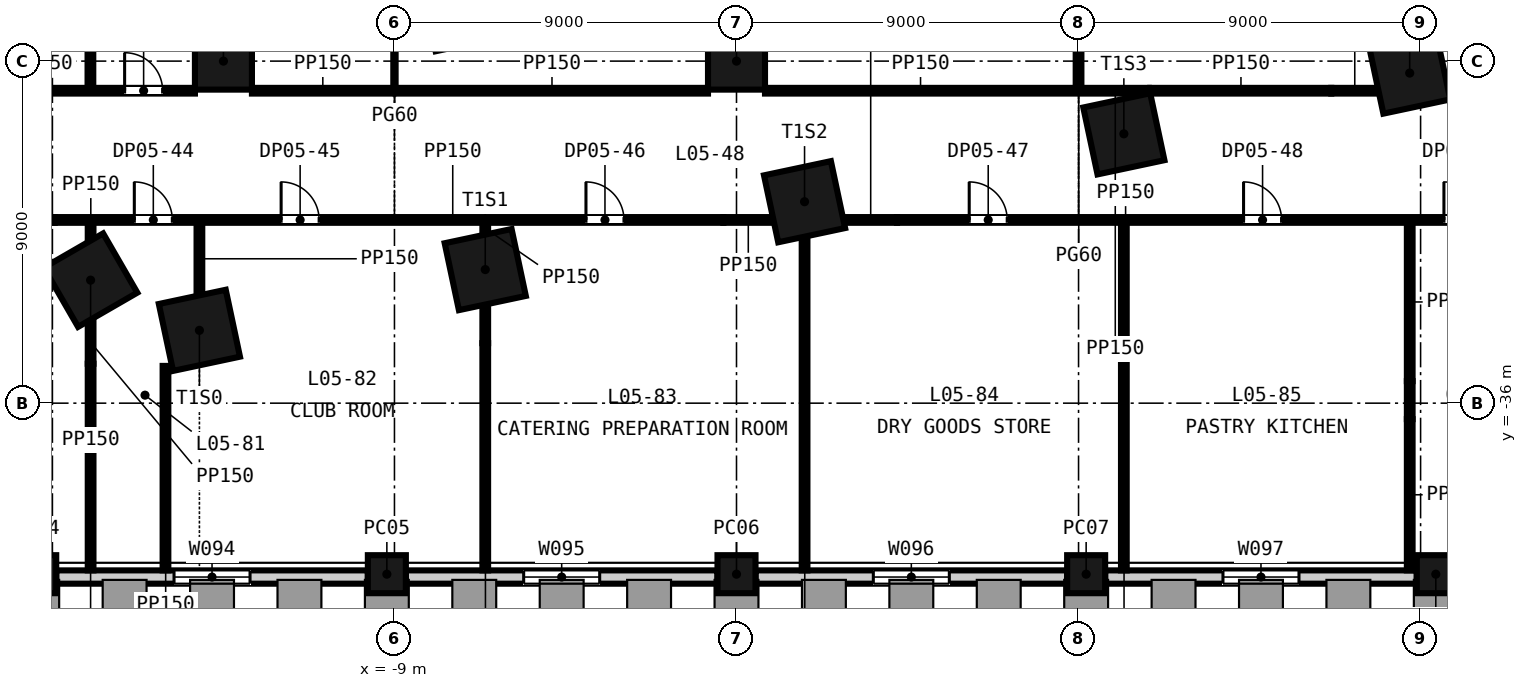
"""IFC4 building model, lengths in metres.
Left out: names, types, materials, properties, quantities, classifications, styles, units other than length and angle.
Written with IfcOpenShell. Run it as: python <this file> out.ifc"""

import sys

from ifc_helpers import new_model, si_unit, direction, frame, frame_2d, origin, origin_2d, place, context, subcontext, project, spatial, rectangle, extrude, element, fill, save


model = new_model("IFC4")
c1 = context("Model", 3, precision=1e-05, world=origin(), true_north=direction((0.0, 1.0)))
c2 = subcontext(c1, "Body", "Model", "MODEL_VIEW")
j1 = project(units=[si_unit("LENGTHUNIT", "METRE"), si_unit("PLANEANGLEUNIT", "RADIAN")], contexts=[c1])
p1 = place(None, origin())
s1 = spatial("IfcSite", under=j1, at=p1, CompositionType="ELEMENT")
p2 = place(p1, origin())
s2 = spatial("IfcBuilding", under=s1, at=p2, CompositionType="ELEMENT")
p3 = place(p2, frame((0.0, 0.0, 31.5)))
s3 = spatial("IfcBuildingStorey", under=s2, at=p3, CompositionType="ELEMENT", Elevation=31.5)
for number, where, z_axis, x_axis in (
    (1, (-16.995, -32.763, -0.3), (0.0, 0.0, 1.0), (0.5, -0.866, 0.0)),
    (2, (-14.132, -34.084, -0.3), (0.0, 0.0, 1.0), (0.978, 0.208, 0.0)),
    (3, (-6.611, -32.485, -0.3), (0.0, 0.0, 1.0), (0.978, 0.208, 0.0)),
    (4, (1.791, -30.699, -0.3), (0.0, 0.0, 1.0), (0.978, 0.208, 0.0)),
    (5, (10.192, -28.914, -0.3), (0.0, 0.0, 1.0), (0.978, 0.208, 0.0)),
    (6, (17.714, -27.315, -0.3), (0.0, 0.0, 1.0), (0.978, 0.208, 0.0)),
):
    element("IfcColumn", number, at=place(p3, frame(where, z_axis=z_axis, x_axis=x_axis)), inside=s3, PredefinedType="COLUMN", context=c2, shape_type="SweptSolid", body=[
        extrude(rectangle(XDim=1.8, YDim=1.8, at=origin_2d()), origin(), (0.0, 0.0, 1.0), 4.65),
    ])
for number, where, z_axis, x_axis in (
    (7, (-13.5, -27.0, -0.3), (0.0, 0.0, 1.0), (1.0, 0.0, 0.0)),
    (8, (0.0, -27.0, -0.3), (0.0, 0.0, 1.0), (1.0, 0.0, 0.0)),
):
    element("IfcColumn", number, at=place(p3, frame(where, z_axis=z_axis, x_axis=x_axis)), inside=s3, PredefinedType="COLUMN", context=c2, shape_type="SweptSolid", body=[
        extrude(rectangle(XDim=1.5, YDim=1.5, at=origin_2d()), origin(), (0.0, 0.0, 1.0), 4.65),
    ])
for number, where, z_axis, x_axis in (
    (9, (-18.4, -40.5, -0.3), (0.0, 0.0, 1.0), (1.0, 0.0, 0.0)),
    (10, (-9.2, -40.5, -0.3), (0.0, 0.0, 1.0), (1.0, 0.0, 0.0)),
    (11, (0.0, -40.5, -0.3), (0.0, 0.0, 1.0), (1.0, 0.0, 0.0)),
    (12, (9.2, -40.5, -0.3), (0.0, 0.0, 1.0), (1.0, 0.0, 0.0)),
    (13, (18.4, -40.5, -0.3), (0.0, 0.0, 1.0), (1.0, 0.0, 0.0)),
):
    element("IfcColumn", number, at=place(p3, frame(where, z_axis=z_axis, x_axis=x_axis)), inside=s3, PredefinedType="COLUMN", context=c2, shape_type="SweptSolid", body=[
        extrude(rectangle(XDim=1.0, YDim=1.0, at=origin_2d()), origin(), (0.0, 0.0, 1.0), 4.65),
    ])
p4 = place(p3, frame((-17.9, -40.575, -0.3), z_axis=(0.0, 0.0, 1.0), x_axis=(1.0, 0.0, 0.0)))
e14 = element("IfcWall", 14, at=p4, inside=s3, PredefinedType="SOLIDWALL", context=c2, shape_type="SweptSolid", body=[
    extrude(rectangle(XDim=8.2, YDim=0.35, at=frame_2d((4.1, 0.0))), origin(), (0.0, 0.0, 1.0), 3.75),
])
p5 = place(p4, frame((3.1, 0.0, 1.2)))
e15 = element("IfcOpeningElement", 15, at=p5, cuts=e14, PredefinedType="OPENING", context=c2, shape_type="SweptSolid", body=[
    extrude(rectangle(XDim=2.0, YDim=2.5, at=frame_2d((1.0, 1.25))), frame((0.0, 0.185, 0.0), z_axis=(0.0, -1.0, 0.0), x_axis=(1.0, 0.0, 0.0)), (0.0, 0.0, 1.0), 0.37),
])
p6 = place(p3, frame((-8.7, -40.575, -0.3), z_axis=(0.0, 0.0, 1.0), x_axis=(1.0, 0.0, 0.0)))
e16 = element("IfcWall", 16, at=p6, inside=s3, PredefinedType="SOLIDWALL", context=c2, shape_type="SweptSolid", body=[
    extrude(rectangle(XDim=8.2, YDim=0.35, at=frame_2d((4.1, 0.0))), origin(), (0.0, 0.0, 1.0), 3.75),
])
p7 = place(p6, frame((3.1, 0.0, 1.2)))
e17 = element("IfcOpeningElement", 17, at=p7, cuts=e16, PredefinedType="OPENING", context=c2, shape_type="SweptSolid", body=[
    extrude(rectangle(XDim=2.0, YDim=2.5, at=frame_2d((1.0, 1.25))), frame((0.0, 0.185, 0.0), z_axis=(0.0, -1.0, 0.0), x_axis=(1.0, 0.0, 0.0)), (0.0, 0.0, 1.0), 0.37),
])
p8 = place(p3, frame((0.5, -40.575, -0.3), z_axis=(0.0, 0.0, 1.0), x_axis=(1.0, 0.0, 0.0)))
e18 = element("IfcWall", 18, at=p8, inside=s3, PredefinedType="SOLIDWALL", context=c2, shape_type="SweptSolid", body=[
    extrude(rectangle(XDim=8.2, YDim=0.35, at=frame_2d((4.1, 0.0))), origin(), (0.0, 0.0, 1.0), 3.75),
])
p9 = place(p8, frame((3.1, 0.0, 1.2)))
e19 = element("IfcOpeningElement", 19, at=p9, cuts=e18, PredefinedType="OPENING", context=c2, shape_type="SweptSolid", body=[
    extrude(rectangle(XDim=2.0, YDim=2.5, at=frame_2d((1.0, 1.25))), frame((0.0, 0.185, 0.0), z_axis=(0.0, -1.0, 0.0), x_axis=(1.0, 0.0, 0.0)), (0.0, 0.0, 1.0), 0.37),
])
p10 = place(p3, frame((9.7, -40.575, -0.3), z_axis=(0.0, 0.0, 1.0), x_axis=(1.0, 0.0, 0.0)))
e20 = element("IfcWall", 20, at=p10, inside=s3, PredefinedType="SOLIDWALL", context=c2, shape_type="SweptSolid", body=[
    extrude(rectangle(XDim=8.2, YDim=0.35, at=frame_2d((4.1, 0.0))), origin(), (0.0, 0.0, 1.0), 3.75),
])
p11 = place(p10, frame((3.1, 0.0, 1.2)))
e21 = element("IfcOpeningElement", 21, at=p11, cuts=e20, PredefinedType="OPENING", context=c2, shape_type="SweptSolid", body=[
    extrude(rectangle(XDim=2.0, YDim=2.5, at=frame_2d((1.0, 1.25))), frame((0.0, 0.185, 0.0), z_axis=(0.0, -1.0, 0.0), x_axis=(1.0, 0.0, 0.0)), (0.0, 0.0, 1.0), 0.37),
])
p12 = place(p3, frame((-19.036, -31.179, 0.0), z_axis=(0.0, 0.0, 1.0), x_axis=(1.0, 0.0, 0.0)))
e22 = element("IfcWall", 22, at=p12, inside=s3, PredefinedType="PARTITIONING", context=c2, shape_type="SweptSolid", body=[
    extrude(rectangle(XDim=1.097, YDim=0.15, at=frame_2d((0.548, 0.0))), origin(), (0.0, 0.0, 1.0), 3.5),
])
p13 = place(p3, frame((-17.939, -31.179, 0.0), z_axis=(0.0, 0.0, 1.0), x_axis=(1.0, 0.0, 0.0)))
e23 = element("IfcWall", 23, at=p13, inside=s3, PredefinedType="PARTITIONING", context=c2, shape_type="SweptSolid", body=[
    extrude(rectangle(XDim=17.593, YDim=0.15, at=frame_2d((8.796, 0.0))), origin(), (0.0, 0.0, 1.0), 4.35),
])
p14 = place(p13, frame((2.094, 0.0, 0.0)))
e24 = element("IfcOpeningElement", 24, at=p14, cuts=e23, PredefinedType="OPENING", context=c2, shape_type="SweptSolid", body=[
    extrude(rectangle(XDim=1.0, YDim=2.1, at=frame_2d((0.5, 1.05))), frame((0.0, 0.085, 0.0), z_axis=(0.0, -1.0, 0.0), x_axis=(1.0, 0.0, 0.0)), (0.0, 0.0, 1.0), 0.17),
])
p15 = place(p13, frame((5.957, 0.0, 0.0)))
e25 = element("IfcOpeningElement", 25, at=p15, cuts=e23, PredefinedType="OPENING", context=c2, shape_type="SweptSolid", body=[
    extrude(rectangle(XDim=1.0, YDim=2.1, at=frame_2d((0.5, 1.05))), frame((0.0, 0.085, 0.0), z_axis=(0.0, -1.0, 0.0), x_axis=(1.0, 0.0, 0.0)), (0.0, 0.0, 1.0), 0.17),
])
p16 = place(p13, frame((13.978, 0.0, 0.0)))
e26 = element("IfcOpeningElement", 26, at=p16, cuts=e23, PredefinedType="OPENING", context=c2, shape_type="SweptSolid", body=[
    extrude(rectangle(XDim=1.0, YDim=2.1, at=frame_2d((0.5, 1.05))), frame((0.0, 0.085, 0.0), z_axis=(0.0, -1.0, 0.0), x_axis=(1.0, 0.0, 0.0)), (0.0, 0.0, 1.0), 0.17),
])
p17 = place(p3, frame((-0.346, -31.179, 0.0), z_axis=(0.0, 0.0, 1.0), x_axis=(1.0, 0.0, 0.0)))
e27 = element("IfcWall", 27, at=p17, inside=s3, PredefinedType="PARTITIONING", context=c2, shape_type="SweptSolid", body=[
    extrude(rectangle(XDim=1.302, YDim=0.15, at=frame_2d((0.651, 0.0))), origin(), (0.0, 0.0, 1.0), 3.5),
])
p18 = place(p3, frame((2.829, -31.179, 0.0), z_axis=(0.0, 0.0, 1.0), x_axis=(1.0, 0.0, 0.0)))
e28 = element("IfcWall", 28, at=p18, inside=s3, PredefinedType="PARTITIONING", context=c2, shape_type="SweptSolid", body=[
    extrude(rectangle(XDim=1.395, YDim=0.15, at=frame_2d((0.697, 0.0))), origin(), (0.0, 0.0, 1.0), 3.5),
])
p19 = place(p3, frame((4.223, -31.179, 0.0), z_axis=(0.0, 0.0, 1.0), x_axis=(1.0, 0.0, 0.0)))
e29 = element("IfcWall", 29, at=p19, inside=s3, PredefinedType="PARTITIONING", context=c2, shape_type="SweptSolid", body=[
    extrude(rectangle(XDim=16.11, YDim=0.15, at=frame_2d((8.055, 0.0))), origin(), (0.0, 0.0, 1.0), 4.35),
])
p20 = place(p19, frame((1.9, 0.0, 0.0)))
e30 = element("IfcOpeningElement", 30, at=p20, cuts=e29, PredefinedType="OPENING", context=c2, shape_type="SweptSolid", body=[
    extrude(rectangle(XDim=1.0, YDim=2.1, at=frame_2d((0.5, 1.05))), frame((0.0, 0.085, 0.0), z_axis=(0.0, -1.0, 0.0), x_axis=(1.0, 0.0, 0.0)), (0.0, 0.0, 1.0), 0.17),
])
p21 = place(p19, frame((9.119, 0.0, 0.0)))
e31 = element("IfcOpeningElement", 31, at=p21, cuts=e29, PredefinedType="OPENING", context=c2, shape_type="SweptSolid", body=[
    extrude(rectangle(XDim=1.0, YDim=2.1, at=frame_2d((0.5, 1.05))), frame((0.0, 0.085, 0.0), z_axis=(0.0, -1.0, 0.0), x_axis=(1.0, 0.0, 0.0)), (0.0, 0.0, 1.0), 0.17),
])
p22 = place(p19, frame((14.391, 0.0, 0.0)))
e32 = element("IfcOpeningElement", 32, at=p22, cuts=e29, PredefinedType="OPENING", context=c2, shape_type="SweptSolid", body=[
    extrude(rectangle(XDim=1.0, YDim=2.1, at=frame_2d((0.5, 1.05))), frame((0.0, 0.085, 0.0), z_axis=(0.0, -1.0, 0.0), x_axis=(1.0, 0.0, 0.0)), (0.0, 0.0, 1.0), 0.17),
])
p23 = place(p3, frame((-20.319, -27.779, 0.0), z_axis=(0.0, 0.0, 1.0), x_axis=(1.0, 0.0, 0.0)))
e33 = element("IfcWall", 33, at=p23, inside=s3, PredefinedType="PARTITIONING", context=c2, shape_type="SweptSolid", body=[
    extrude(rectangle(XDim=6.069, YDim=0.15, at=frame_2d((3.035, 0.0))), origin(), (0.0, 0.0, 1.0), 4.35),
])
p24 = place(p23, frame((4.219, 0.0, 0.0)))
e34 = element("IfcOpeningElement", 34, at=p24, cuts=e33, PredefinedType="OPENING", context=c2, shape_type="SweptSolid", body=[
    extrude(rectangle(XDim=1.0, YDim=2.1, at=frame_2d((0.5, 1.05))), frame((0.0, 0.085, 0.0), z_axis=(0.0, -1.0, 0.0), x_axis=(1.0, 0.0, 0.0)), (0.0, 0.0, 1.0), 0.17),
])
p25 = place(p3, frame((-12.75, -27.779, 0.0), z_axis=(0.0, 0.0, 1.0), x_axis=(1.0, 0.0, 0.0)))
e35 = element("IfcWall", 35, at=p25, inside=s3, PredefinedType="PARTITIONING", context=c2, shape_type="SweptSolid", body=[
    extrude(rectangle(XDim=3.72, YDim=0.15, at=frame_2d((1.86, 0.0))), origin(), (0.0, 0.0, 1.0), 4.35),
])
p26 = place(p3, frame((-8.97, -27.779, 0.0), z_axis=(0.0, 0.0, 1.0), x_axis=(1.0, 0.0, 0.0)))
e36 = element("IfcWall", 36, at=p26, inside=s3, PredefinedType="PARTITIONING", context=c2, shape_type="SweptSolid", body=[
    extrude(rectangle(XDim=8.22, YDim=0.15, at=frame_2d((4.11, 0.0))), origin(), (0.0, 0.0, 1.0), 4.35),
])
p27 = place(p3, frame((0.75, -27.779, 0.0), z_axis=(0.0, 0.0, 1.0), x_axis=(1.0, 0.0, 0.0)))
e37 = element("IfcWall", 37, at=p27, inside=s3, PredefinedType="PARTITIONING", context=c2, shape_type="SweptSolid", body=[
    extrude(rectangle(XDim=8.175, YDim=0.15, at=frame_2d((4.087, 0.0))), origin(), (0.0, 0.0, 1.0), 4.35),
])
p28 = place(p3, frame((9.075, -27.779, 0.0), z_axis=(0.0, 0.0, 1.0), x_axis=(1.0, 0.0, 0.0)))
e38 = element("IfcWall", 38, at=p28, inside=s3, PredefinedType="PARTITIONING", context=c2, shape_type="SweptSolid", body=[
    extrude(rectangle(XDim=1.773, YDim=0.15, at=frame_2d((0.886, 0.0))), origin(), (0.0, 0.0, 1.0), 4.35),
])
p29 = place(p3, frame((10.887, -27.779, 0.0), z_axis=(0.0, 0.0, 1.0), x_axis=(1.0, 0.0, 0.0)))
e39 = element("IfcWall", 39, at=p29, inside=s3, PredefinedType="PARTITIONING", context=c2, shape_type="SweptSolid", body=[
    extrude(rectangle(XDim=4.762, YDim=0.15, at=frame_2d((2.381, 0.0))), origin(), (0.0, 0.0, 1.0), 4.35),
])
p30 = place(p3, frame((15.65, -27.779, 0.0), z_axis=(0.0, 0.0, 1.0), x_axis=(1.0, 0.0, 0.0)))
e40 = element("IfcWall", 40, at=p30, inside=s3, PredefinedType="PARTITIONING", context=c2, shape_type="SweptSolid", body=[
    extrude(rectangle(XDim=1.227, YDim=0.15, at=frame_2d((0.613, 0.0))), origin(), (0.0, 0.0, 1.0), 3.5),
])
p31 = place(p3, frame((-17.0, -27.704, 0.0), z_axis=(0.0, 0.0, 1.0), x_axis=(0.0, 1.0, 0.0)))
e41 = element("IfcWall", 41, at=p31, inside=s3, PredefinedType="PARTITIONING", context=c2, shape_type="SweptSolid", body=[
    extrude(rectangle(XDim=12.14, YDim=0.15, at=frame_2d((6.07, 0.0))), origin(), (0.0, 0.0, 1.0), 4.35),
])
p32 = place(p3, frame((-16.995, -40.4, 0.0), z_axis=(0.0, 0.0, 1.0), x_axis=(0.0, 1.0, 0.0)))
e42 = element("IfcWall", 42, at=p32, inside=s3, PredefinedType="PARTITIONING", context=c2, shape_type="SweptSolid", body=[
    extrude(rectangle(XDim=5.438, YDim=0.15, at=frame_2d((2.719, 0.0))), origin(), (0.0, 0.0, 1.0), 4.35),
])
p33 = place(p3, frame((-16.995, -34.962, 0.0), z_axis=(0.0, 0.0, 1.0), x_axis=(0.0, 1.0, 0.0)))
e43 = element("IfcWall", 43, at=p33, inside=s3, PredefinedType="PARTITIONING", context=c2, shape_type="SweptSolid", body=[
    extrude(rectangle(XDim=1.117, YDim=0.15, at=frame_2d((0.558, 0.0))), origin(), (0.0, 0.0, 1.0), 3.826),
])
p34 = place(p3, frame((-16.995, -31.681, 0.0), z_axis=(0.0, 0.0, 1.0), x_axis=(0.0, 1.0, 0.0)))
e44 = element("IfcWall", 44, at=p34, inside=s3, PredefinedType="PARTITIONING", context=c2, shape_type="SweptSolid", body=[
    extrude(rectangle(XDim=0.427, YDim=0.15, at=frame_2d((0.213, 0.0))), origin(), (0.0, 0.0, 1.0), 4.35),
])
p35 = place(p3, frame((-15.025, -40.4, 0.0), z_axis=(0.0, 0.0, 1.0), x_axis=(0.0, 1.0, 0.0)))
e45 = element("IfcWall", 45, at=p35, inside=s3, PredefinedType="PARTITIONING", context=c2, shape_type="SweptSolid", body=[
    extrude(rectangle(XDim=5.38, YDim=0.15, at=frame_2d((2.69, 0.0))), origin(), (0.0, 0.0, 1.0), 4.35),
])
p36 = place(p3, frame((-14.132, -33.148, 0.0), z_axis=(0.0, 0.0, 1.0), x_axis=(0.0, 1.0, 0.0)))
e46 = element("IfcWall", 46, at=p36, inside=s3, PredefinedType="PARTITIONING", context=c2, shape_type="SweptSolid", body=[
    extrude(rectangle(XDim=1.894, YDim=0.15, at=frame_2d((0.947, 0.0))), origin(), (0.0, 0.0, 1.0), 4.35),
])
p37 = place(p3, frame((-9.0, -27.778, 0.0), z_axis=(0.0, 0.0, 1.0), x_axis=(0.0, 1.0, 0.0)))
e47 = element("IfcWall", 47, at=p37, inside=s3, PredefinedType="PARTITIONING", context=c2, shape_type="SweptSolid", body=[
    extrude(rectangle(XDim=12.288, YDim=0.06, at=frame_2d((6.144, 0.0))), origin(), (0.0, 0.0, 1.0), 4.35),
])
p38 = place(p3, frame((-6.611, -40.4, 0.0), z_axis=(0.0, 0.0, 1.0), x_axis=(0.0, 1.0, 0.0)))
e48 = element("IfcWall", 48, at=p38, inside=s3, PredefinedType="PARTITIONING", context=c2, shape_type="SweptSolid", body=[
    extrude(rectangle(XDim=5.979, YDim=0.15, at=frame_2d((2.989, 0.0))), origin(), (0.0, 0.0, 1.0), 4.35),
])
p39 = place(p3, frame((-6.611, -34.421, 0.0), z_axis=(0.0, 0.0, 1.0), x_axis=(0.0, 1.0, 0.0)))
e49 = element("IfcWall", 49, at=p39, inside=s3, PredefinedType="PARTITIONING", context=c2, shape_type="SweptSolid", body=[
    extrude(rectangle(XDim=1.0, YDim=0.15, at=frame_2d((0.5, 0.0))), origin(), (0.0, 0.0, 1.0), 3.826),
])
p40 = place(p3, frame((-6.611, -31.549, 0.0), z_axis=(0.0, 0.0, 1.0), x_axis=(0.0, 1.0, 0.0)))
e50 = element("IfcWall", 50, at=p40, inside=s3, PredefinedType="PARTITIONING", context=c2, shape_type="SweptSolid", body=[
    extrude(rectangle(XDim=0.295, YDim=0.15, at=frame_2d((0.147, 0.0))), origin(), (0.0, 0.0, 1.0), 4.35),
])
p41 = place(p3, frame((1.791, -40.4, 0.0), z_axis=(0.0, 0.0, 1.0), x_axis=(0.0, 1.0, 0.0)))
e51 = element("IfcWall", 51, at=p41, inside=s3, PredefinedType="PARTITIONING", context=c2, shape_type="SweptSolid", body=[
    extrude(rectangle(XDim=8.765, YDim=0.15, at=frame_2d((4.382, 0.0))), origin(), (0.0, 0.0, 1.0), 4.35),
])
p42 = place(p3, frame((9.0, -27.778, 0.0), z_axis=(0.0, 0.0, 1.0), x_axis=(0.0, 1.0, 0.0)))
e52 = element("IfcWall", 52, at=p42, inside=s3, PredefinedType="PARTITIONING", context=c2, shape_type="SweptSolid", body=[
    extrude(rectangle(XDim=3.825, YDim=0.15, at=frame_2d((1.913, 0.0))), origin(), (0.0, 0.0, 1.0), 4.35),
])
p43 = place(p3, frame((10.192, -40.4, 0.0), z_axis=(0.0, 0.0, 1.0), x_axis=(0.0, 1.0, 0.0)))
e53 = element("IfcWall", 53, at=p43, inside=s3, PredefinedType="PARTITIONING", context=c2, shape_type="SweptSolid", body=[
    extrude(rectangle(XDim=9.146, YDim=0.15, at=frame_2d((4.573, 0.0))), origin(), (0.0, 0.0, 1.0), 4.35),
])
p44 = place(p3, frame((17.714, -40.4, 0.0), z_axis=(0.0, 0.0, 1.0), x_axis=(0.0, 1.0, 0.0)))
e54 = element("IfcWall", 54, at=p44, inside=s3, PredefinedType="PARTITIONING", context=c2, shape_type="SweptSolid", body=[
    extrude(rectangle(XDim=3.979, YDim=0.15, at=frame_2d((1.99, 0.0))), origin(), (0.0, 0.0, 1.0), 4.35),
])
p45 = place(p3, frame((17.714, -36.42, 0.0), z_axis=(0.0, 0.0, 1.0), x_axis=(0.0, 1.0, 0.0)))
e55 = element("IfcWall", 55, at=p45, inside=s3, PredefinedType="PARTITIONING", context=c2, shape_type="SweptSolid", body=[
    extrude(rectangle(XDim=1.0, YDim=0.15, at=frame_2d((0.5, 0.0))), origin(), (0.0, 0.0, 1.0), 3.601),
])
p46 = place(p3, frame((17.714, -35.42, 0.0), z_axis=(0.0, 0.0, 1.0), x_axis=(0.0, 1.0, 0.0)))
e56 = element("IfcWall", 56, at=p46, inside=s3, PredefinedType="PARTITIONING", context=c2, shape_type="SweptSolid", body=[
    extrude(rectangle(XDim=4.167, YDim=0.15, at=frame_2d((2.083, 0.0))), origin(), (0.0, 0.0, 1.0), 4.35),
])
p47 = place(p5, origin())
e57 = element("IfcWindow", 57, at=p47, inside=s3, PartitioningType="SINGLE_PANEL", PredefinedType="WINDOW", context=c2, shape_type="SweptSolid", body=[
    extrude(rectangle(XDim=2.0, YDim=2.5, at=frame_2d((1.0, 1.25))), frame((0.0, 0.03, 0.0), z_axis=(0.0, -1.0, 0.0), x_axis=(1.0, 0.0, 0.0)), (0.0, 0.0, 1.0), 0.06),
])
fill(e15, e57)
p48 = place(p7, origin())
e58 = element("IfcWindow", 58, at=p48, inside=s3, PartitioningType="SINGLE_PANEL", PredefinedType="WINDOW", context=c2, shape_type="SweptSolid", body=[
    extrude(rectangle(XDim=2.0, YDim=2.5, at=frame_2d((1.0, 1.25))), frame((0.0, 0.03, 0.0), z_axis=(0.0, -1.0, 0.0), x_axis=(1.0, 0.0, 0.0)), (0.0, 0.0, 1.0), 0.06),
])
fill(e17, e58)
p49 = place(p9, origin())
e59 = element("IfcWindow", 59, at=p49, inside=s3, PartitioningType="SINGLE_PANEL", PredefinedType="WINDOW", context=c2, shape_type="SweptSolid", body=[
    extrude(rectangle(XDim=2.0, YDim=2.5, at=frame_2d((1.0, 1.25))), frame((0.0, 0.03, 0.0), z_axis=(0.0, -1.0, 0.0), x_axis=(1.0, 0.0, 0.0)), (0.0, 0.0, 1.0), 0.06),
])
fill(e19, e59)
p50 = place(p11, origin())
e60 = element("IfcWindow", 60, at=p50, inside=s3, PartitioningType="SINGLE_PANEL", PredefinedType="WINDOW", context=c2, shape_type="SweptSolid", body=[
    extrude(rectangle(XDim=2.0, YDim=2.5, at=frame_2d((1.0, 1.25))), frame((0.0, 0.03, 0.0), z_axis=(0.0, -1.0, 0.0), x_axis=(1.0, 0.0, 0.0)), (0.0, 0.0, 1.0), 0.06),
])
fill(e21, e60)
p51 = place(p24, origin())
e61 = element("IfcDoor", 61, at=p51, inside=s3, OperationType="SINGLE_SWING_LEFT", PredefinedType="DOOR", context=c2, shape_type="SweptSolid", body=[
    extrude(rectangle(XDim=1.0, YDim=2.1, at=frame_2d((0.5, 1.05))), frame((0.0, 0.025, 0.0), z_axis=(0.0, -1.0, 0.0), x_axis=(1.0, 0.0, 0.0)), (0.0, 0.0, 1.0), 0.05),
])
fill(e34, e61)
p52 = place(p14, origin())
e62 = element("IfcDoor", 62, at=p52, inside=s3, OperationType="SINGLE_SWING_LEFT", PredefinedType="DOOR", context=c2, shape_type="SweptSolid", body=[
    extrude(rectangle(XDim=1.0, YDim=2.1, at=frame_2d((0.5, 1.05))), frame((0.0, 0.025, 0.0), z_axis=(0.0, -1.0, 0.0), x_axis=(1.0, 0.0, 0.0)), (0.0, 0.0, 1.0), 0.05),
])
fill(e24, e62)
p53 = place(p15, origin())
e63 = element("IfcDoor", 63, at=p53, inside=s3, OperationType="SINGLE_SWING_LEFT", PredefinedType="DOOR", context=c2, shape_type="SweptSolid", body=[
    extrude(rectangle(XDim=1.0, YDim=2.1, at=frame_2d((0.5, 1.05))), frame((0.0, 0.025, 0.0), z_axis=(0.0, -1.0, 0.0), x_axis=(1.0, 0.0, 0.0)), (0.0, 0.0, 1.0), 0.05),
])
fill(e25, e63)
p54 = place(p16, origin())
e64 = element("IfcDoor", 64, at=p54, inside=s3, OperationType="SINGLE_SWING_LEFT", PredefinedType="DOOR", context=c2, shape_type="SweptSolid", body=[
    extrude(rectangle(XDim=1.0, YDim=2.1, at=frame_2d((0.5, 1.05))), frame((0.0, 0.025, 0.0), z_axis=(0.0, -1.0, 0.0), x_axis=(1.0, 0.0, 0.0)), (0.0, 0.0, 1.0), 0.05),
])
fill(e26, e64)
p55 = place(p20, origin())
e65 = element("IfcDoor", 65, at=p55, inside=s3, OperationType="SINGLE_SWING_LEFT", PredefinedType="DOOR", context=c2, shape_type="SweptSolid", body=[
    extrude(rectangle(XDim=1.0, YDim=2.1, at=frame_2d((0.5, 1.05))), frame((0.0, 0.025, 0.0), z_axis=(0.0, -1.0, 0.0), x_axis=(1.0, 0.0, 0.0)), (0.0, 0.0, 1.0), 0.05),
])
fill(e30, e65)
p56 = place(p21, origin())
e66 = element("IfcDoor", 66, at=p56, inside=s3, OperationType="SINGLE_SWING_LEFT", PredefinedType="DOOR", context=c2, shape_type="SweptSolid", body=[
    extrude(rectangle(XDim=1.0, YDim=2.1, at=frame_2d((0.5, 1.05))), frame((0.0, 0.025, 0.0), z_axis=(0.0, -1.0, 0.0), x_axis=(1.0, 0.0, 0.0)), (0.0, 0.0, 1.0), 0.05),
])
fill(e31, e66)
p57 = place(p22, origin())
e67 = element("IfcDoor", 67, at=p57, inside=s3, OperationType="SINGLE_SWING_LEFT", PredefinedType="DOOR", context=c2, shape_type="SweptSolid", body=[
    extrude(rectangle(XDim=1.0, YDim=2.1, at=frame_2d((0.5, 1.05))), frame((0.0, 0.025, 0.0), z_axis=(0.0, -1.0, 0.0), x_axis=(1.0, 0.0, 0.0)), (0.0, 0.0, 1.0), 0.05),
])
fill(e32, e67)
save(model, sys.argv[1])
